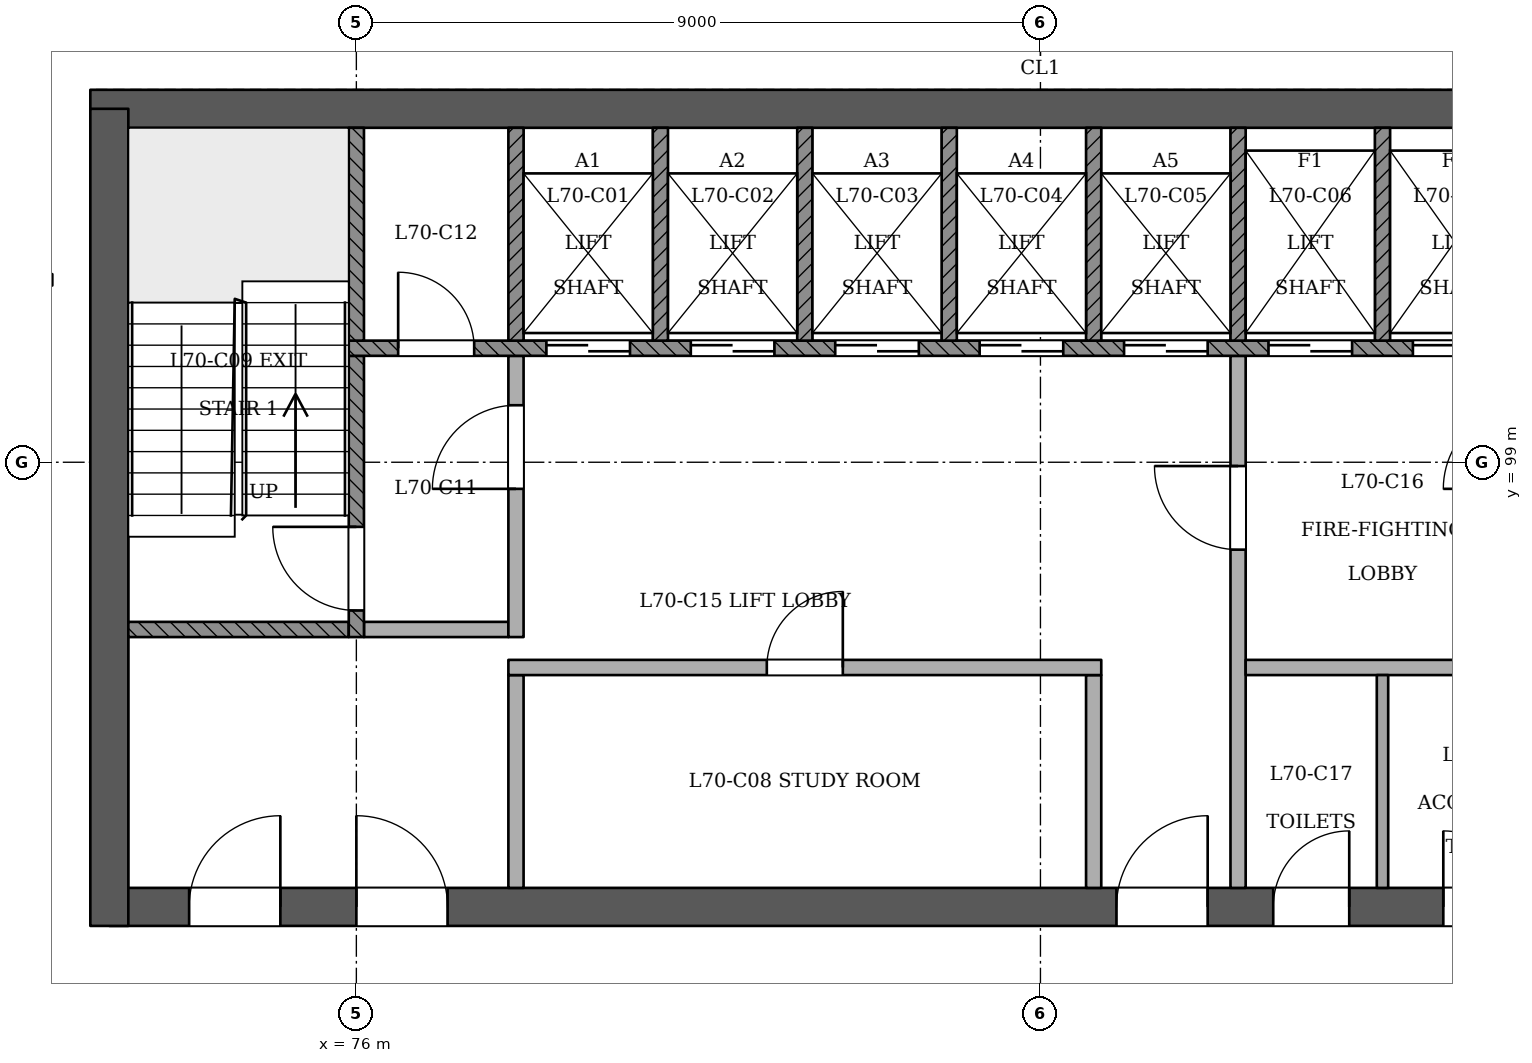
"""IFC4 building model, lengths in metres.
Left out: names, types, materials, properties, quantities, classifications, styles, units other than length and angle.
Written with IfcOpenShell. Run it as: python <this file> out.ifc"""

import sys

from ifc_helpers import new_model, si_unit, direction, frame, frame_2d, origin, place, context, subcontext, project, spatial, rectangle, extrude, element, fill, save


model = new_model("IFC4")
c1 = context("Model", 3, precision=1e-05, world=origin(), true_north=direction((0.0, 1.0)))
c2 = subcontext(c1, "Body", "Model", "MODEL_VIEW")
j1 = project(units=[si_unit("LENGTHUNIT", "METRE"), si_unit("PLANEANGLEUNIT", "RADIAN")], contexts=[c1])
p1 = place(None, origin())
s1 = spatial("IfcSite", under=j1, at=p1, CompositionType="ELEMENT")
p2 = place(p1, origin())
s2 = spatial("IfcBuilding", under=s1, at=p2, CompositionType="ELEMENT")
p3 = place(p2, frame((0.0, 0.0, 271.6)))
s3 = spatial("IfcBuildingStorey", under=s2, at=p3, CompositionType="ELEMENT", Elevation=271.6)
p4 = place(p3, frame((72.75, 93.15, 0.0), z_axis=(0.0, 0.0, 1.0), x_axis=(1.0, 0.0, 0.0)))
e1 = element("IfcWall", 1, at=p4, inside=s3, PredefinedType="SHEAR", context=c2, shape_type="SweptSolid", body=[
    extrude(rectangle(XDim=24.75, YDim=0.5, at=frame_2d((12.375, 0.0))), origin(), (0.0, 0.0, 1.0), 3.6),
])
p5 = place(p4, frame((1.05, 0.0, 0.0)))
e2 = element("IfcOpeningElement", 2, at=p5, cuts=e1, PredefinedType="OPENING", context=c2, shape_type="SweptSolid", body=[
    extrude(rectangle(XDim=1.2, YDim=2.1, at=frame_2d((0.6, 1.05))), frame((0.0, 0.26, 0.0), z_axis=(0.0, -1.0, 0.0), x_axis=(1.0, 0.0, 0.0)), (0.0, 0.0, 1.0), 0.521),
])
p6 = place(p4, frame((3.25, 0.0, 0.0)))
e3 = element("IfcOpeningElement", 3, at=p6, cuts=e1, PredefinedType="OPENING", context=c2, shape_type="SweptSolid", body=[
    extrude(rectangle(XDim=1.2, YDim=2.1, at=frame_2d((0.6, 1.05))), frame((0.0, 0.26, 0.0), z_axis=(0.0, -1.0, 0.0), x_axis=(1.0, 0.0, 0.0)), (0.0, 0.0, 1.0), 0.521),
])
p7 = place(p4, frame((13.25, 0.0, 0.0)))
e4 = element("IfcOpeningElement", 4, at=p7, cuts=e1, PredefinedType="OPENING", context=c2, shape_type="SweptSolid", body=[
    extrude(rectangle(XDim=1.2, YDim=2.1, at=frame_2d((0.6, 1.05))), frame((0.0, 0.26, 0.0), z_axis=(0.0, -1.0, 0.0), x_axis=(1.0, 0.0, 0.0)), (0.0, 0.0, 1.0), 0.521),
])
p8 = place(p4, frame((15.312, 0.0, 0.0)))
e5 = element("IfcOpeningElement", 5, at=p8, cuts=e1, PredefinedType="OPENING", context=c2, shape_type="SweptSolid", body=[
    extrude(rectangle(XDim=1.0, YDim=2.1, at=frame_2d((0.5, 1.05))), frame((0.0, 0.26, 0.0), z_axis=(0.0, -1.0, 0.0), x_axis=(1.0, 0.0, 0.0)), (0.0, 0.0, 1.0), 0.521),
])
p9 = place(p4, frame((17.55, 0.0, 0.0)))
e6 = element("IfcOpeningElement", 6, at=p9, cuts=e1, PredefinedType="OPENING", context=c2, shape_type="SweptSolid", body=[
    extrude(rectangle(XDim=1.0, YDim=2.1, at=frame_2d((0.5, 1.05))), frame((0.0, 0.26, 0.0), z_axis=(0.0, -1.0, 0.0), x_axis=(1.0, 0.0, 0.0)), (0.0, 0.0, 1.0), 0.521),
])
p10 = place(p4, frame((20.1, 0.0, 0.0)))
e7 = element("IfcOpeningElement", 7, at=p10, cuts=e1, PredefinedType="OPENING", context=c2, shape_type="SweptSolid", body=[
    extrude(rectangle(XDim=1.0, YDim=2.1, at=frame_2d((0.5, 1.05))), frame((0.0, 0.26, 0.0), z_axis=(0.0, -1.0, 0.0), x_axis=(1.0, 0.0, 0.0)), (0.0, 0.0, 1.0), 0.521),
])
p11 = place(p4, frame((22.587, 0.0, 0.0)))
e8 = element("IfcOpeningElement", 8, at=p11, cuts=e1, PredefinedType="OPENING", context=c2, shape_type="SweptSolid", body=[
    extrude(rectangle(XDim=1.0, YDim=2.1, at=frame_2d((0.5, 1.05))), frame((0.0, 0.26, 0.0), z_axis=(0.0, -1.0, 0.0), x_axis=(1.0, 0.0, 0.0)), (0.0, 0.0, 1.0), 0.521),
])
p12 = place(p3, frame((97.25, 103.65, 0.0), z_axis=(0.0, 0.0, 1.0), x_axis=(-1.0, 0.0, 0.0)))
e9 = element("IfcWall", 9, at=p12, inside=s3, PredefinedType="SHEAR", context=c2, shape_type="SweptSolid", body=[
    extrude(rectangle(XDim=24.75, YDim=0.5, at=frame_2d((12.375, 0.0))), origin(), (0.0, 0.0, 1.0), 3.6),
])
p13 = place(p3, frame((72.75, 103.65, 0.0), z_axis=(0.0, 0.0, 1.0), x_axis=(0.0, -1.0, 0.0)))
e10 = element("IfcWall", 10, at=p13, inside=s3, PredefinedType="SHEAR", context=c2, shape_type="SweptSolid", body=[
    extrude(rectangle(XDim=10.75, YDim=0.5, at=frame_2d((5.375, 0.0))), origin(), (0.0, 0.0, 1.0), 3.6),
])
p14 = place(p3, frame((72.0, 101.4, 0.0), z_axis=(0.0, 0.0, 1.0), x_axis=(-1.0, 0.0, 0.0)))
e11 = element("IfcWall", 11, at=p14, inside=s3, PredefinedType="PARTITIONING", context=c2, shape_type="SweptSolid", body=[
    extrude(rectangle(XDim=1.8, YDim=0.15, at=frame_2d((0.9, 0.0))), origin(), (0.0, 0.0, 1.0), 3.2),
])
for number, where, z_axis, x_axis in (
    (12, (78.1, 93.4, 0.0), (0.0, 0.0, 1.0), (0.0, 1.0, 0.0)),
    (13, (85.7, 93.4, 0.0), (0.0, 0.0, 1.0), (0.0, 1.0, 0.0)),
):
    element("IfcWall", number, at=place(p3, frame(where, z_axis=z_axis, x_axis=x_axis)), inside=s3, PredefinedType="PARTITIONING", context=c2, shape_type="SweptSolid", body=[
        extrude(rectangle(XDim=2.8, YDim=0.2, at=frame_2d((1.4, 0.0))), origin(), (0.0, 0.0, 1.0), 3.2),
    ])
p15 = place(p3, frame((87.6, 93.4, 0.0), z_axis=(0.0, 0.0, 1.0), x_axis=(0.0, 1.0, 0.0)))
e14 = element("IfcWall", 14, at=p15, inside=s3, PredefinedType="PARTITIONING", context=c2, shape_type="SweptSolid", body=[
    extrude(rectangle(XDim=7.0, YDim=0.2, at=frame_2d((3.5, 0.0))), origin(), (0.0, 0.0, 1.0), 3.2),
])
p16 = place(p15, frame((4.45, 0.0, 0.0)))
e15 = element("IfcOpeningElement", 15, at=p16, cuts=e14, PredefinedType="OPENING", context=c2, shape_type="SweptSolid", body=[
    extrude(rectangle(XDim=1.1, YDim=2.1, at=frame_2d((0.55, 1.05))), frame((0.0, 0.11, 0.0), z_axis=(0.0, -1.0, 0.0), x_axis=(1.0, 0.0, 0.0)), (0.0, 0.0, 1.0), 0.221),
])
p17 = place(p3, frame((89.5, 93.4, 0.0), z_axis=(0.0, 0.0, 1.0), x_axis=(0.0, 1.0, 0.0)))
e16 = element("IfcWall", 16, at=p17, inside=s3, PredefinedType="PARTITIONING", context=c2, shape_type="SweptSolid", body=[
    extrude(rectangle(XDim=2.8, YDim=0.15, at=frame_2d((1.4, 0.0))), origin(), (0.0, 0.0, 1.0), 3.2),
])
p18 = place(p3, frame((78.0, 96.3, 0.0), z_axis=(0.0, 0.0, 1.0), x_axis=(1.0, 0.0, 0.0)))
e17 = element("IfcWall", 17, at=p18, inside=s3, PredefinedType="PARTITIONING", context=c2, shape_type="SweptSolid", body=[
    extrude(rectangle(XDim=7.8, YDim=0.2, at=frame_2d((3.9, 0.0))), origin(), (0.0, 0.0, 1.0), 3.2),
])
p19 = place(p18, frame((3.4, 0.0, 0.0)))
e18 = element("IfcOpeningElement", 18, at=p19, cuts=e17, PredefinedType="OPENING", context=c2, shape_type="SweptSolid", body=[
    extrude(rectangle(XDim=1.0, YDim=2.1, at=frame_2d((0.5, 1.05))), frame((0.0, 0.11, 0.0), z_axis=(0.0, -1.0, 0.0), x_axis=(1.0, 0.0, 0.0)), (0.0, 0.0, 1.0), 0.221),
])
p20 = place(p3, frame((87.7, 96.3, 0.0), z_axis=(0.0, 0.0, 1.0), x_axis=(1.0, 0.0, 0.0)))
e19 = element("IfcWall", 19, at=p20, inside=s3, PredefinedType="PARTITIONING", context=c2, shape_type="SweptSolid", body=[
    extrude(rectangle(XDim=3.6, YDim=0.2, at=frame_2d((1.8, 0.0))), origin(), (0.0, 0.0, 1.0), 3.2),
])
p21 = place(p3, frame((73.0, 96.8, 0.0), z_axis=(0.0, 0.0, 1.0), x_axis=(1.0, 0.0, 0.0)))
e20 = element("IfcWall", 20, at=p21, inside=s3, PredefinedType="SOLIDWALL", context=c2, shape_type="SweptSolid", body=[
    extrude(rectangle(XDim=2.9, YDim=0.2, at=frame_2d((1.45, 0.0))), origin(), (0.0, 0.0, 1.0), 3.2),
])
p22 = place(p3, frame((76.0, 96.7, 0.0), z_axis=(0.0, 0.0, 1.0), x_axis=(0.0, 1.0, 0.0)))
e21 = element("IfcWall", 21, at=p22, inside=s3, PredefinedType="SOLIDWALL", context=c2, shape_type="SweptSolid", body=[
    extrude(rectangle(XDim=3.7, YDim=0.2, at=frame_2d((1.85, 0.0))), origin(), (0.0, 0.0, 1.0), 3.2),
])
p23 = place(p22, frame((0.35, 0.0, 0.0)))
e22 = element("IfcOpeningElement", 22, at=p23, cuts=e21, PredefinedType="OPENING", context=c2, shape_type="SweptSolid", body=[
    extrude(rectangle(XDim=1.1, YDim=2.1, at=frame_2d((0.55, 1.05))), frame((0.0, 0.11, 0.0), z_axis=(0.0, -1.0, 0.0), x_axis=(1.0, 0.0, 0.0)), (0.0, 0.0, 1.0), 0.221),
])
p24 = place(p3, frame((76.1, 96.8, 0.0), z_axis=(0.0, 0.0, 1.0), x_axis=(1.0, 0.0, 0.0)))
e23 = element("IfcWall", 23, at=p24, inside=s3, PredefinedType="PARTITIONING", context=c2, shape_type="SweptSolid", body=[
    extrude(rectangle(XDim=1.9, YDim=0.2, at=frame_2d((0.95, 0.0))), origin(), (0.0, 0.0, 1.0), 3.2),
])
p25 = place(p3, frame((78.1, 96.7, 0.0), z_axis=(0.0, 0.0, 1.0), x_axis=(0.0, 1.0, 0.0)))
e24 = element("IfcWall", 24, at=p25, inside=s3, PredefinedType="PARTITIONING", context=c2, shape_type="SweptSolid", body=[
    extrude(rectangle(XDim=3.7, YDim=0.2, at=frame_2d((1.85, 0.0))), origin(), (0.0, 0.0, 1.0), 3.2),
])
p26 = place(p25, frame((1.95, 0.0, 0.0)))
e25 = element("IfcOpeningElement", 25, at=p26, cuts=e24, PredefinedType="OPENING", context=c2, shape_type="SweptSolid", body=[
    extrude(rectangle(XDim=1.1, YDim=2.1, at=frame_2d((0.55, 1.05))), frame((0.0, 0.11, 0.0), z_axis=(0.0, -1.0, 0.0), x_axis=(1.0, 0.0, 0.0)), (0.0, 0.0, 1.0), 0.221),
])
p27 = place(p3, frame((75.9, 100.5, 0.0), z_axis=(0.0, 0.0, 1.0), x_axis=(1.0, 0.0, 0.0)))
e26 = element("IfcWall", 26, at=p27, inside=s3, PredefinedType="SOLIDWALL", context=c2, shape_type="SweptSolid", body=[
    extrude(rectangle(XDim=18.2, YDim=0.2, at=frame_2d((9.1, 0.0))), origin(), (0.0, 0.0, 1.0), 3.2),
])
p28 = place(p27, frame((2.6, 0.0, 0.0)))
e27 = element("IfcOpeningElement", 27, at=p28, cuts=e26, PredefinedType="OPENING", context=c2, shape_type="SweptSolid", body=[
    extrude(rectangle(XDim=1.1, YDim=2.1, at=frame_2d((0.55, 1.05))), frame((0.0, 0.11, 0.0), z_axis=(0.0, -1.0, 0.0), x_axis=(1.0, 0.0, 0.0)), (0.0, 0.0, 1.0), 0.221),
])
p29 = place(p27, frame((4.5, 0.0, 0.0)))
e28 = element("IfcOpeningElement", 28, at=p29, cuts=e26, PredefinedType="OPENING", context=c2, shape_type="SweptSolid", body=[
    extrude(rectangle(XDim=1.1, YDim=2.1, at=frame_2d((0.55, 1.05))), frame((0.0, 0.11, 0.0), z_axis=(0.0, -1.0, 0.0), x_axis=(1.0, 0.0, 0.0)), (0.0, 0.0, 1.0), 0.221),
])
p30 = place(p27, frame((6.4, 0.0, 0.0)))
e29 = element("IfcOpeningElement", 29, at=p30, cuts=e26, PredefinedType="OPENING", context=c2, shape_type="SweptSolid", body=[
    extrude(rectangle(XDim=1.1, YDim=2.1, at=frame_2d((0.55, 1.05))), frame((0.0, 0.11, 0.0), z_axis=(0.0, -1.0, 0.0), x_axis=(1.0, 0.0, 0.0)), (0.0, 0.0, 1.0), 0.221),
])
p31 = place(p27, frame((8.3, 0.0, 0.0)))
e30 = element("IfcOpeningElement", 30, at=p31, cuts=e26, PredefinedType="OPENING", context=c2, shape_type="SweptSolid", body=[
    extrude(rectangle(XDim=1.1, YDim=2.1, at=frame_2d((0.55, 1.05))), frame((0.0, 0.11, 0.0), z_axis=(0.0, -1.0, 0.0), x_axis=(1.0, 0.0, 0.0)), (0.0, 0.0, 1.0), 0.221),
])
p32 = place(p27, frame((10.2, 0.0, 0.0)))
e31 = element("IfcOpeningElement", 31, at=p32, cuts=e26, PredefinedType="OPENING", context=c2, shape_type="SweptSolid", body=[
    extrude(rectangle(XDim=1.1, YDim=2.1, at=frame_2d((0.55, 1.05))), frame((0.0, 0.11, 0.0), z_axis=(0.0, -1.0, 0.0), x_axis=(1.0, 0.0, 0.0)), (0.0, 0.0, 1.0), 0.221),
])
p33 = place(p27, frame((12.1, 0.0, 0.0)))
e32 = element("IfcOpeningElement", 32, at=p33, cuts=e26, PredefinedType="OPENING", context=c2, shape_type="SweptSolid", body=[
    extrude(rectangle(XDim=1.1, YDim=2.1, at=frame_2d((0.55, 1.05))), frame((0.0, 0.11, 0.0), z_axis=(0.0, -1.0, 0.0), x_axis=(1.0, 0.0, 0.0)), (0.0, 0.0, 1.0), 0.221),
])
p34 = place(p27, frame((14.0, 0.0, 0.0)))
e33 = element("IfcOpeningElement", 33, at=p34, cuts=e26, PredefinedType="OPENING", context=c2, shape_type="SweptSolid", body=[
    extrude(rectangle(XDim=1.1, YDim=2.1, at=frame_2d((0.55, 1.05))), frame((0.0, 0.11, 0.0), z_axis=(0.0, -1.0, 0.0), x_axis=(1.0, 0.0, 0.0)), (0.0, 0.0, 1.0), 0.221),
])
p35 = place(p27, frame((0.65, 0.0, 0.0)))
e34 = element("IfcOpeningElement", 34, at=p35, cuts=e26, PredefinedType="OPENING", context=c2, shape_type="SweptSolid", body=[
    extrude(rectangle(XDim=1.0, YDim=2.1, at=frame_2d((0.5, 1.05))), frame((0.0, 0.11, 0.0), z_axis=(0.0, -1.0, 0.0), x_axis=(1.0, 0.0, 0.0)), (0.0, 0.0, 1.0), 0.221),
])
p36 = place(p27, frame((16.3, 0.0, 0.0)))
e35 = element("IfcOpeningElement", 35, at=p36, cuts=e26, PredefinedType="OPENING", context=c2, shape_type="SweptSolid", body=[
    extrude(rectangle(XDim=1.0, YDim=2.1, at=frame_2d((0.5, 1.05))), frame((0.0, 0.11, 0.0), z_axis=(0.0, -1.0, 0.0), x_axis=(1.0, 0.0, 0.0)), (0.0, 0.0, 1.0), 0.221),
])
for number, where, z_axis, x_axis in (
    (36, (76.0, 100.6, 0.0), (0.0, 0.0, 1.0), (0.0, 1.0, 0.0)),
    (37, (78.1, 100.6, 0.0), (0.0, 0.0, 1.0), (0.0, 1.0, 0.0)),
    (38, (80.0, 100.6, 0.0), (0.0, 0.0, 1.0), (0.0, 1.0, 0.0)),
    (39, (81.9, 100.6, 0.0), (0.0, 0.0, 1.0), (0.0, 1.0, 0.0)),
    (40, (83.8, 100.6, 0.0), (0.0, 0.0, 1.0), (0.0, 1.0, 0.0)),
    (41, (85.7, 100.6, 0.0), (0.0, 0.0, 1.0), (0.0, 1.0, 0.0)),
    (42, (87.6, 100.6, 0.0), (0.0, 0.0, 1.0), (0.0, 1.0, 0.0)),
    (43, (89.5, 100.6, 0.0), (0.0, 0.0, 1.0), (0.0, 1.0, 0.0)),
):
    element("IfcWall", number, at=place(p3, frame(where, z_axis=z_axis, x_axis=x_axis)), inside=s3, PredefinedType="SOLIDWALL", context=c2, shape_type="SweptSolid", body=[
        extrude(rectangle(XDim=2.8, YDim=0.2, at=frame_2d((1.4, 0.0))), origin(), (0.0, 0.0, 1.0), 3.2),
    ])
p37 = place(p28, origin())
e44 = element("IfcDoor", 44, at=p37, inside=s3, OperationType="SLIDING_TO_RIGHT", PredefinedType="NOTDEFINED", context=c2, shape_type="SweptSolid", body=[
    extrude(rectangle(XDim=1.1, YDim=2.1, at=frame_2d((0.55, 1.05))), frame((0.0, 0.025, 0.0), z_axis=(0.0, -1.0, 0.0), x_axis=(1.0, 0.0, 0.0)), (0.0, 0.0, 1.0), 0.05),
])
fill(e27, e44)
p38 = place(p29, origin())
e45 = element("IfcDoor", 45, at=p38, inside=s3, OperationType="SLIDING_TO_LEFT", PredefinedType="NOTDEFINED", context=c2, shape_type="SweptSolid", body=[
    extrude(rectangle(XDim=1.1, YDim=2.1, at=frame_2d((0.55, 1.05))), frame((0.0, 0.025, 0.0), z_axis=(0.0, -1.0, 0.0), x_axis=(1.0, 0.0, 0.0)), (0.0, 0.0, 1.0), 0.05),
])
fill(e28, e45)
p39 = place(p30, origin())
e46 = element("IfcDoor", 46, at=p39, inside=s3, OperationType="SLIDING_TO_RIGHT", PredefinedType="NOTDEFINED", context=c2, shape_type="SweptSolid", body=[
    extrude(rectangle(XDim=1.1, YDim=2.1, at=frame_2d((0.55, 1.05))), frame((0.0, 0.025, 0.0), z_axis=(0.0, -1.0, 0.0), x_axis=(1.0, 0.0, 0.0)), (0.0, 0.0, 1.0), 0.05),
])
fill(e29, e46)
p40 = place(p31, origin())
e47 = element("IfcDoor", 47, at=p40, inside=s3, OperationType="SLIDING_TO_LEFT", PredefinedType="NOTDEFINED", context=c2, shape_type="SweptSolid", body=[
    extrude(rectangle(XDim=1.1, YDim=2.1, at=frame_2d((0.55, 1.05))), frame((0.0, 0.025, 0.0), z_axis=(0.0, -1.0, 0.0), x_axis=(1.0, 0.0, 0.0)), (0.0, 0.0, 1.0), 0.05),
])
fill(e30, e47)
p41 = place(p32, origin())
e48 = element("IfcDoor", 48, at=p41, inside=s3, OperationType="SLIDING_TO_RIGHT", PredefinedType="NOTDEFINED", context=c2, shape_type="SweptSolid", body=[
    extrude(rectangle(XDim=1.1, YDim=2.1, at=frame_2d((0.55, 1.05))), frame((0.0, 0.025, 0.0), z_axis=(0.0, -1.0, 0.0), x_axis=(1.0, 0.0, 0.0)), (0.0, 0.0, 1.0), 0.05),
])
fill(e31, e48)
p42 = place(p33, origin())
e49 = element("IfcDoor", 49, at=p42, inside=s3, OperationType="SLIDING_TO_RIGHT", PredefinedType="NOTDEFINED", context=c2, shape_type="SweptSolid", body=[
    extrude(rectangle(XDim=1.1, YDim=2.1, at=frame_2d((0.55, 1.05))), frame((0.0, 0.025, 0.0), z_axis=(0.0, -1.0, 0.0), x_axis=(1.0, 0.0, 0.0)), (0.0, 0.0, 1.0), 0.05),
])
fill(e32, e49)
p43 = place(p34, origin())
e50 = element("IfcDoor", 50, at=p43, inside=s3, OperationType="SLIDING_TO_LEFT", PredefinedType="NOTDEFINED", context=c2, shape_type="SweptSolid", body=[
    extrude(rectangle(XDim=1.1, YDim=2.1, at=frame_2d((0.55, 1.05))), frame((0.0, 0.025, 0.0), z_axis=(0.0, -1.0, 0.0), x_axis=(1.0, 0.0, 0.0)), (0.0, 0.0, 1.0), 0.05),
])
fill(e33, e50)
p44 = place(p23, origin())
e51 = element("IfcDoor", 51, at=p44, inside=s3, OperationType="SINGLE_SWING_RIGHT", PredefinedType="NOTDEFINED", context=c2, shape_type="SweptSolid", body=[
    extrude(rectangle(XDim=1.1, YDim=2.1, at=frame_2d((0.55, 1.05))), frame((0.0, 0.025, 0.0), z_axis=(0.0, -1.0, 0.0), x_axis=(1.0, 0.0, 0.0)), (0.0, 0.0, 1.0), 0.05),
])
fill(e22, e51)
p45 = place(p26, origin())
e52 = element("IfcDoor", 52, at=p45, inside=s3, OperationType="SINGLE_SWING_LEFT", PredefinedType="NOTDEFINED", context=c2, shape_type="SweptSolid", body=[
    extrude(rectangle(XDim=1.1, YDim=2.1, at=frame_2d((0.55, 1.05))), frame((0.0, 0.025, 0.0), z_axis=(0.0, -1.0, 0.0), x_axis=(1.0, 0.0, 0.0)), (0.0, 0.0, 1.0), 0.05),
])
fill(e25, e52)
p46 = place(p16, origin())
e53 = element("IfcDoor", 53, at=p46, inside=s3, OperationType="SINGLE_SWING_RIGHT", PredefinedType="NOTDEFINED", context=c2, shape_type="SweptSolid", body=[
    extrude(rectangle(XDim=1.1, YDim=2.1, at=frame_2d((0.55, 1.05))), frame((0.0, 0.025, 0.0), z_axis=(0.0, -1.0, 0.0), x_axis=(1.0, 0.0, 0.0)), (0.0, 0.0, 1.0), 0.05),
])
fill(e15, e53)
p47 = place(p5, origin())
e54 = element("IfcDoor", 54, at=p47, inside=s3, OperationType="SINGLE_SWING_RIGHT", PredefinedType="NOTDEFINED", context=c2, shape_type="SweptSolid", body=[
    extrude(rectangle(XDim=1.2, YDim=2.1, at=frame_2d((0.6, 1.05))), frame((0.0, 0.025, 0.0), z_axis=(0.0, -1.0, 0.0), x_axis=(1.0, 0.0, 0.0)), (0.0, 0.0, 1.0), 0.05),
])
fill(e2, e54)
p48 = place(p6, origin())
e55 = element("IfcDoor", 55, at=p48, inside=s3, OperationType="SINGLE_SWING_LEFT", PredefinedType="NOTDEFINED", context=c2, shape_type="SweptSolid", body=[
    extrude(rectangle(XDim=1.2, YDim=2.1, at=frame_2d((0.6, 1.05))), frame((0.0, 0.025, 0.0), z_axis=(0.0, -1.0, 0.0), x_axis=(1.0, 0.0, 0.0)), (0.0, 0.0, 1.0), 0.05),
])
fill(e3, e55)
p49 = place(p7, origin())
e56 = element("IfcDoor", 56, at=p49, inside=s3, OperationType="SINGLE_SWING_RIGHT", PredefinedType="NOTDEFINED", context=c2, shape_type="SweptSolid", body=[
    extrude(rectangle(XDim=1.2, YDim=2.1, at=frame_2d((0.6, 1.05))), frame((0.0, 0.025, 0.0), z_axis=(0.0, -1.0, 0.0), x_axis=(1.0, 0.0, 0.0)), (0.0, 0.0, 1.0), 0.05),
])
fill(e4, e56)
p50 = place(p35, origin())
e57 = element("IfcDoor", 57, at=p50, inside=s3, OperationType="SINGLE_SWING_LEFT", PredefinedType="NOTDEFINED", context=c2, shape_type="SweptSolid", body=[
    extrude(rectangle(XDim=1.0, YDim=2.1, at=frame_2d((0.5, 1.05))), frame((0.0, 0.025, 0.0), z_axis=(0.0, -1.0, 0.0), x_axis=(1.0, 0.0, 0.0)), (0.0, 0.0, 1.0), 0.05),
])
fill(e34, e57)
p51 = place(p8, origin())
e58 = element("IfcDoor", 58, at=p51, inside=s3, OperationType="SINGLE_SWING_RIGHT", PredefinedType="NOTDEFINED", context=c2, shape_type="SweptSolid", body=[
    extrude(rectangle(XDim=1.0, YDim=2.1, at=frame_2d((0.5, 1.05))), frame((0.0, 0.025, 0.0), z_axis=(0.0, -1.0, 0.0), x_axis=(1.0, 0.0, 0.0)), (0.0, 0.0, 1.0), 0.05),
])
fill(e5, e58)
p52 = place(p9, origin())
e59 = element("IfcDoor", 59, at=p52, inside=s3, OperationType="SINGLE_SWING_LEFT", PredefinedType="NOTDEFINED", context=c2, shape_type="SweptSolid", body=[
    extrude(rectangle(XDim=1.0, YDim=2.1, at=frame_2d((0.5, 1.05))), frame((0.0, 0.025, 0.0), z_axis=(0.0, -1.0, 0.0), x_axis=(1.0, 0.0, 0.0)), (0.0, 0.0, 1.0), 0.05),
])
fill(e6, e59)
p53 = place(p19, origin())
e60 = element("IfcDoor", 60, at=p53, inside=s3, OperationType="SINGLE_SWING_RIGHT", PredefinedType="NOTDEFINED", context=c2, shape_type="SweptSolid", body=[
    extrude(rectangle(XDim=1.0, YDim=2.1, at=frame_2d((0.5, 1.05))), frame((0.0, 0.025, 0.0), z_axis=(0.0, -1.0, 0.0), x_axis=(1.0, 0.0, 0.0)), (0.0, 0.0, 1.0), 0.05),
])
fill(e18, e60)
save(model, sys.argv[1])
